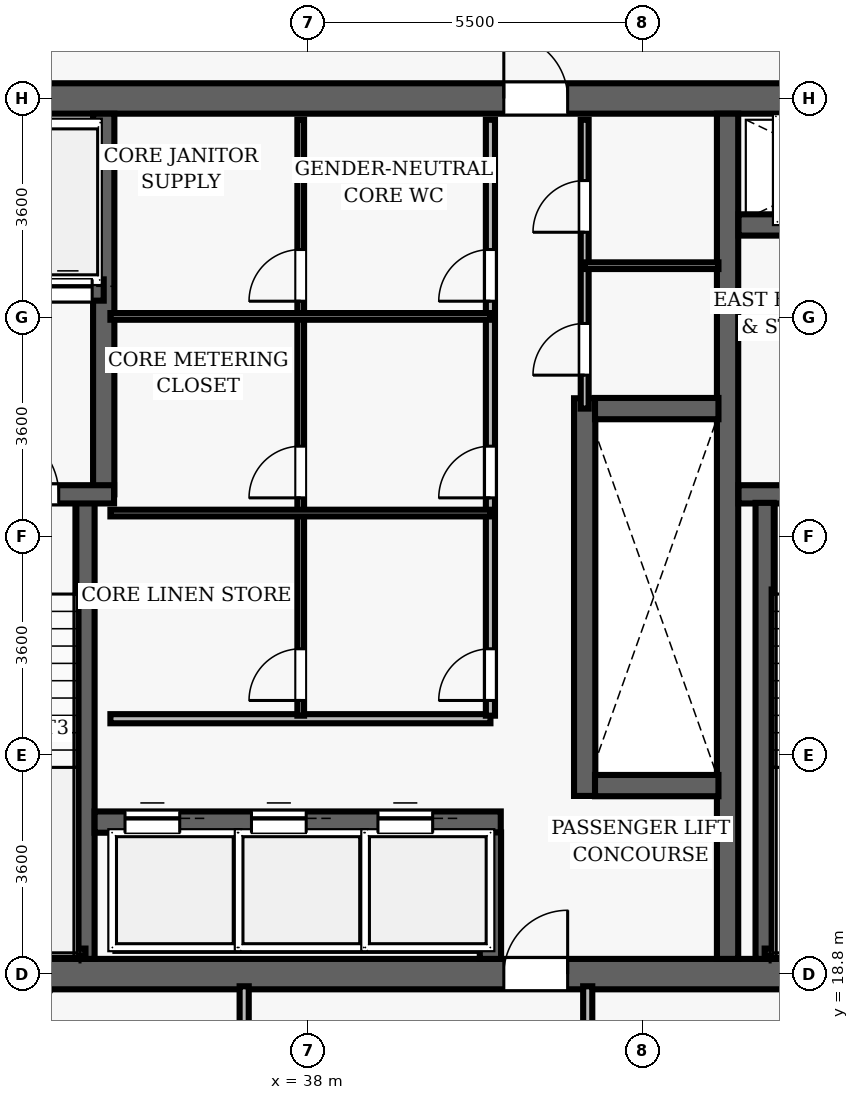
"""IFC4 building model, lengths in metres.
Left out: names, types, materials, properties, quantities, classifications, styles, units other than length and angle.
Written with IfcOpenShell. Run it as: python <this file> out.ifc"""

import sys

from ifc_helpers import new_model, si_unit, direction, frame, frame_2d, origin, place, context, subcontext, project, spatial, rectangle, extrude, element, fill, save


model = new_model("IFC4")
c1 = context("Model", 3, precision=1e-05, world=origin(), true_north=direction((0.0, 1.0)))
c2 = subcontext(c1, "Body", "Model", "MODEL_VIEW")
j1 = project(units=[si_unit("LENGTHUNIT", "METRE"), si_unit("PLANEANGLEUNIT", "RADIAN")], contexts=[c1])
p1 = place(None, origin())
s1 = spatial("IfcSite", under=j1, at=p1, CompositionType="ELEMENT")
p2 = place(p1, origin())
s2 = spatial("IfcBuilding", under=s1, at=p2, CompositionType="ELEMENT")
p3 = place(p2, frame((0.0, 0.0, 175.05)))
s3 = spatial("IfcBuildingStorey", under=s2, at=p3, CompositionType="ELEMENT", Elevation=175.05)
p4 = place(p3, frame((26.75, 18.8, 0.0), z_axis=(0.0, 0.0, 1.0), x_axis=(1.0, 0.0, 0.0)))
e1 = element("IfcWall", 1, at=p4, inside=s3, PredefinedType="SHEAR", context=c2, shape_type="SweptSolid", body=[
    extrude(rectangle(XDim=22.5, YDim=0.5, at=frame_2d((11.25, 0.0))), origin(), (0.0, 0.0, 1.0), 3.85),
])
p5 = place(p4, frame((14.47, 0.0, 0.0)))
e2 = element("IfcOpeningElement", 2, at=p5, cuts=e1, PredefinedType="OPENING", context=c2, shape_type="SweptSolid", body=[
    extrude(rectangle(XDim=1.05, YDim=2.15, at=frame_2d((0.525, 1.075))), frame((0.0, 0.26, 0.0), z_axis=(0.0, -1.0, 0.0), x_axis=(1.0, 0.0, 0.0)), (0.0, 0.0, 1.0), 0.52),
])
p6 = place(p3, frame((26.75, 33.2, 0.0), z_axis=(0.0, 0.0, 1.0), x_axis=(1.0, 0.0, 0.0)))
e3 = element("IfcWall", 3, at=p6, inside=s3, PredefinedType="SHEAR", context=c2, shape_type="SweptSolid", body=[
    extrude(rectangle(XDim=22.5, YDim=0.5, at=frame_2d((11.25, 0.0))), origin(), (0.0, 0.0, 1.0), 3.85),
])
p7 = place(p6, frame((4.57, 0.0, 0.0)))
e4 = element("IfcOpeningElement", 4, at=p7, cuts=e3, PredefinedType="OPENING", context=c2, shape_type="SweptSolid", body=[
    extrude(rectangle(XDim=1.05, YDim=2.15, at=frame_2d((0.525, 1.075))), frame((0.0, 0.26, 0.0), z_axis=(0.0, -1.0, 0.0), x_axis=(1.0, 0.0, 0.0)), (0.0, 0.0, 1.0), 0.52),
])
p8 = place(p6, frame((14.47, 0.0, 0.0)))
e5 = element("IfcOpeningElement", 5, at=p8, cuts=e3, PredefinedType="OPENING", context=c2, shape_type="SweptSolid", body=[
    extrude(rectangle(XDim=1.05, YDim=2.15, at=frame_2d((0.525, 1.075))), frame((0.0, 0.26, 0.0), z_axis=(0.0, -1.0, 0.0), x_axis=(1.0, 0.0, 0.0)), (0.0, 0.0, 1.0), 0.52),
])
p9 = place(p3, frame((44.9, 19.05, 0.0), z_axis=(0.0, 0.0, 1.0), x_axis=(0.0, 1.0, 0.0)))
e6 = element("IfcWall", 6, at=p9, inside=s3, PredefinedType="SHEAR", context=c2, shape_type="SweptSolid", body=[
    extrude(rectangle(XDim=13.9, YDim=0.35, at=frame_2d((6.95, 0.0))), origin(), (0.0, 0.0, 1.0), 3.85),
])
p10 = place(p3, frame((45.08, 26.69, 0.0), z_axis=(0.0, 0.0, 1.0), x_axis=(1.0, 0.0, 0.0)))
e7 = element("IfcWall", 7, at=p10, inside=s3, PredefinedType="SHEAR", context=c2, shape_type="SweptSolid", body=[
    extrude(rectangle(XDim=3.67, YDim=0.3, at=frame_2d((1.835, 0.0))), origin(), (0.0, 0.0, 1.0), 3.85),
])
p11 = place(p10, frame((1.05, 0.0, 0.0)))
e8 = element("IfcOpeningElement", 8, at=p11, cuts=e7, PredefinedType="OPENING", context=c2, shape_type="SweptSolid", body=[
    extrude(rectangle(XDim=1.1, YDim=2.15, at=frame_2d((0.55, 1.075))), frame((0.0, 0.16, 0.0), z_axis=(0.0, -1.0, 0.0), x_axis=(1.0, 0.0, 0.0)), (0.0, 0.0, 1.0), 0.32),
])
p12 = place(p3, frame((45.51, 19.05, 0.0), z_axis=(0.0, 0.0, 1.0), x_axis=(0.0, 1.0, 0.0)))
e9 = element("IfcWall", 9, at=p12, inside=s3, PredefinedType="SHEAR", context=c2, shape_type="SweptSolid", body=[
    extrude(rectangle(XDim=7.5, YDim=0.3, at=frame_2d((3.75, 0.0))), origin(), (0.0, 0.0, 1.0), 3.85),
])
p13 = place(p3, frame((45.51, 19.16, 0.0), z_axis=(0.0, 0.0, 1.0), x_axis=(1.0, 0.0, 0.0)))
e10 = element("IfcWall", 10, at=p13, inside=s3, PredefinedType="SHEAR", context=c2, shape_type="SweptSolid", body=[
    extrude(rectangle(XDim=3.095, YDim=0.12, at=frame_2d((1.547, 0.0))), origin(), (0.0, 0.0, 1.0), 3.85),
])
p14 = place(p3, frame((45.08, 31.12, 0.0), z_axis=(0.0, 0.0, 1.0), x_axis=(1.0, 0.0, 0.0)))
e11 = element("IfcWall", 11, at=p14, inside=s3, PredefinedType="SHEAR", context=c2, shape_type="SweptSolid", body=[
    extrude(rectangle(XDim=3.67, YDim=0.35, at=frame_2d((1.835, 0.0))), origin(), (0.0, 0.0, 1.0), 3.035),
])
p15 = place(p14, frame((1.25, 0.0, 0.0)))
e12 = element("IfcOpeningElement", 12, at=p15, cuts=e11, PredefinedType="OPENING", context=c2, shape_type="SweptSolid", body=[
    extrude(rectangle(XDim=1.1, YDim=2.15, at=frame_2d((0.55, 1.075))), frame((0.0, 0.185, 0.0), z_axis=(0.0, -1.0, 0.0), x_axis=(1.0, 0.0, 0.0)), (0.0, 0.0, 1.0), 0.37),
])
p16 = place(p3, frame((34.34, 19.05, 0.0), z_axis=(0.0, 0.0, 1.0), x_axis=(0.0, 1.0, 0.0)))
e13 = element("IfcWall", 13, at=p16, inside=s3, PredefinedType="SHEAR", context=c2, shape_type="SweptSolid", body=[
    extrude(rectangle(XDim=7.5, YDim=0.3, at=frame_2d((3.75, 0.0))), origin(), (0.0, 0.0, 1.0), 3.85),
])
p17 = place(p3, frame((34.64, 26.69, 0.0), z_axis=(0.0, 0.0, 1.0), x_axis=(0.0, 1.0, 0.0)))
e14 = element("IfcWall", 14, at=p17, inside=s3, PredefinedType="SHEAR", context=c2, shape_type="SweptSolid", body=[
    extrude(rectangle(XDim=6.26, YDim=0.35, at=frame_2d((3.13, 0.0))), origin(), (0.0, 0.0, 1.0), 3.85),
])
p18 = place(p3, frame((31.25, 26.69, 0.0), z_axis=(0.0, 0.0, 1.0), x_axis=(1.0, 0.0, 0.0)))
e15 = element("IfcWall", 15, at=p18, inside=s3, PredefinedType="SHEAR", context=c2, shape_type="SweptSolid", body=[
    extrude(rectangle(XDim=3.56, YDim=0.3, at=frame_2d((1.78, 0.0))), origin(), (0.0, 0.0, 1.0), 3.85),
])
p19 = place(p18, frame((1.55, 0.0, 0.0)))
e16 = element("IfcOpeningElement", 16, at=p19, cuts=e15, PredefinedType="OPENING", context=c2, shape_type="SweptSolid", body=[
    extrude(rectangle(XDim=1.1, YDim=2.15, at=frame_2d((0.55, 1.075))), frame((0.0, 0.16, 0.0), z_axis=(0.0, -1.0, 0.0), x_axis=(1.0, 0.0, 0.0)), (0.0, 0.0, 1.0), 0.32),
])
p20 = place(p3, frame((31.3, 19.16, 0.0), z_axis=(0.0, 0.0, 1.0), x_axis=(1.0, 0.0, 0.0)))
e17 = element("IfcWall", 17, at=p20, inside=s3, PredefinedType="SHEAR", context=c2, shape_type="SweptSolid", body=[
    extrude(rectangle(XDim=3.04, YDim=0.12, at=frame_2d((1.52, 0.0))), origin(), (0.0, 0.0, 1.0), 3.85),
])
p21 = place(p3, frame((32.23, 30.05, 0.0), z_axis=(0.0, 0.0, 1.0), x_axis=(1.0, 0.0, 0.0)))
e18 = element("IfcWall", 18, at=p21, inside=s3, PredefinedType="SHEAR", context=c2, shape_type="SweptSolid", body=[
    extrude(rectangle(XDim=2.41, YDim=0.35, at=frame_2d((1.205, 0.0))), origin(), (0.0, 0.0, 1.0), 3.035),
])
p22 = place(p21, frame((0.42, 0.0, 0.0)))
e19 = element("IfcOpeningElement", 19, at=p22, cuts=e18, PredefinedType="OPENING", context=c2, shape_type="SweptSolid", body=[
    extrude(rectangle(XDim=0.8, YDim=2.15, at=frame_2d((0.4, 1.075))), frame((0.0, 0.185, 0.0), z_axis=(0.0, -1.0, 0.0), x_axis=(1.0, 0.0, 0.0)), (0.0, 0.0, 1.0), 0.37),
])
p23 = place(p21, frame((1.42, 0.0, 0.0)))
e20 = element("IfcOpeningElement", 20, at=p23, cuts=e18, PredefinedType="OPENING", context=c2, shape_type="SweptSolid", body=[
    extrude(rectangle(XDim=0.8, YDim=2.15, at=frame_2d((0.4, 1.075))), frame((0.0, 0.185, 0.0), z_axis=(0.0, -1.0, 0.0), x_axis=(1.0, 0.0, 0.0)), (0.0, 0.0, 1.0), 0.37),
])
p24 = place(p3, frame((42.55, 21.73, 0.0), z_axis=(0.0, 0.0, 1.0), x_axis=(0.0, 1.0, 0.0)))
e21 = element("IfcWall", 21, at=p24, inside=s3, PredefinedType="SHEAR", context=c2, shape_type="SweptSolid", body=[
    extrude(rectangle(XDim=6.54, YDim=0.35, at=frame_2d((3.27, 0.0))), origin(), (0.0, 0.0, 1.0), 3.035),
])
for number, where, z_axis, x_axis in (
    (22, (42.72, 21.9, 0.0), (0.0, 0.0, 1.0), (1.0, 0.0, 0.0)),
    (23, (42.72, 28.1, 0.0), (0.0, 0.0, 1.0), (1.0, 0.0, 0.0)),
):
    element("IfcWall", number, at=place(p3, frame(where, z_axis=z_axis, x_axis=x_axis)), inside=s3, PredefinedType="SHEAR", context=c2, shape_type="SweptSolid", body=[
        extrude(rectangle(XDim=2.03, YDim=0.35, at=frame_2d((1.015, 0.0))), origin(), (0.0, 0.0, 1.0), 3.035),
    ])
p25 = place(p3, frame((34.49, 21.3, 0.0), z_axis=(0.0, 0.0, 1.0), x_axis=(1.0, 0.0, 0.0)))
e24 = element("IfcWall", 24, at=p25, inside=s3, PredefinedType="SHEAR", context=c2, shape_type="SweptSolid", body=[
    extrude(rectangle(XDim=6.68, YDim=0.35, at=frame_2d((3.34, 0.0))), origin(), (0.0, 0.0, 1.0), 3.035),
])
p26 = place(p25, frame((0.5, 0.0, 0.0)))
e25 = element("IfcOpeningElement", 25, at=p26, cuts=e24, PredefinedType="OPENING", context=c2, shape_type="SweptSolid", body=[
    extrude(rectangle(XDim=0.9, YDim=2.15, at=frame_2d((0.45, 1.075))), frame((0.0, 0.185, 0.0), z_axis=(0.0, -1.0, 0.0), x_axis=(1.0, 0.0, 0.0)), (0.0, 0.0, 1.0), 0.37),
])
p27 = place(p25, frame((2.58, 0.0, 0.0)))
e26 = element("IfcOpeningElement", 26, at=p27, cuts=e24, PredefinedType="OPENING", context=c2, shape_type="SweptSolid", body=[
    extrude(rectangle(XDim=0.9, YDim=2.15, at=frame_2d((0.45, 1.075))), frame((0.0, 0.185, 0.0), z_axis=(0.0, -1.0, 0.0), x_axis=(1.0, 0.0, 0.0)), (0.0, 0.0, 1.0), 0.37),
])
p28 = place(p25, frame((4.66, 0.0, 0.0)))
e27 = element("IfcOpeningElement", 27, at=p28, cuts=e24, PredefinedType="OPENING", context=c2, shape_type="SweptSolid", body=[
    extrude(rectangle(XDim=0.9, YDim=2.15, at=frame_2d((0.45, 1.075))), frame((0.0, 0.185, 0.0), z_axis=(0.0, -1.0, 0.0), x_axis=(1.0, 0.0, 0.0)), (0.0, 0.0, 1.0), 0.37),
])
p29 = place(p3, frame((41.0, 19.05, 0.0), z_axis=(0.0, 0.0, 1.0), x_axis=(0.0, 1.0, 0.0)))
e28 = element("IfcWall", 28, at=p29, inside=s3, PredefinedType="SHEAR", context=c2, shape_type="SweptSolid", body=[
    extrude(rectangle(XDim=2.08, YDim=0.35, at=frame_2d((1.04, 0.0))), origin(), (0.0, 0.0, 1.0), 3.035),
])
p30 = place(p3, frame((34.75, 23.0, 0.0), z_axis=(0.0, 0.0, 1.0), x_axis=(1.0, 0.0, 0.0)))
e29 = element("IfcWall", 29, at=p30, inside=s3, PredefinedType="PARTITIONING", context=c2, shape_type="SweptSolid", body=[
    extrude(rectangle(XDim=6.25, YDim=0.15, at=frame_2d((3.125, 0.0))), origin(), (0.0, 0.0, 1.0), 3.035),
])
p31 = place(p3, frame((41.0, 23.05, 0.0), z_axis=(0.0, 0.0, 1.0), x_axis=(0.0, 1.0, 0.0)))
e30 = element("IfcWall", 30, at=p31, inside=s3, PredefinedType="PARTITIONING", context=c2, shape_type="SweptSolid", body=[
    extrude(rectangle(XDim=9.8, YDim=0.15, at=frame_2d((4.9, 0.0))), origin(), (0.0, 0.0, 1.0), 3.035),
])
p32 = place(p31, frame((0.25, 0.0, 0.0)))
e31 = element("IfcOpeningElement", 31, at=p32, cuts=e30, PredefinedType="OPENING", context=c2, shape_type="SweptSolid", body=[
    extrude(rectangle(XDim=0.85, YDim=2.1, at=frame_2d((0.425, 1.05))), frame((0.0, 0.085, 0.0), z_axis=(0.0, -1.0, 0.0), x_axis=(1.0, 0.0, 0.0)), (0.0, 0.0, 1.0), 0.17),
])
p33 = place(p31, frame((3.582, 0.0, 0.0)))
e32 = element("IfcOpeningElement", 32, at=p33, cuts=e30, PredefinedType="OPENING", context=c2, shape_type="SweptSolid", body=[
    extrude(rectangle(XDim=0.85, YDim=2.1, at=frame_2d((0.425, 1.05))), frame((0.0, 0.085, 0.0), z_axis=(0.0, -1.0, 0.0), x_axis=(1.0, 0.0, 0.0)), (0.0, 0.0, 1.0), 0.17),
])
p34 = place(p31, frame((6.816, 0.0, 0.0)))
e33 = element("IfcOpeningElement", 33, at=p34, cuts=e30, PredefinedType="OPENING", context=c2, shape_type="SweptSolid", body=[
    extrude(rectangle(XDim=0.85, YDim=2.1, at=frame_2d((0.425, 1.05))), frame((0.0, 0.085, 0.0), z_axis=(0.0, -1.0, 0.0), x_axis=(1.0, 0.0, 0.0)), (0.0, 0.0, 1.0), 0.17),
])
p35 = place(p3, frame((37.88, 23.05, 0.0), z_axis=(0.0, 0.0, 1.0), x_axis=(0.0, 1.0, 0.0)))
e34 = element("IfcWall", 34, at=p35, inside=s3, PredefinedType="PARTITIONING", context=c2, shape_type="SweptSolid", body=[
    extrude(rectangle(XDim=9.8, YDim=0.11, at=frame_2d((4.9, 0.0))), origin(), (0.0, 0.0, 1.0), 3.035),
])
p36 = place(p35, frame((0.25, 0.0, 0.0)))
e35 = element("IfcOpeningElement", 35, at=p36, cuts=e34, PredefinedType="OPENING", context=c2, shape_type="SweptSolid", body=[
    extrude(rectangle(XDim=0.85, YDim=2.1, at=frame_2d((0.425, 1.05))), frame((0.0, 0.065, 0.0), z_axis=(0.0, -1.0, 0.0), x_axis=(1.0, 0.0, 0.0)), (0.0, 0.0, 1.0), 0.13),
])
p37 = place(p35, frame((3.582, 0.0, 0.0)))
e36 = element("IfcOpeningElement", 36, at=p37, cuts=e34, PredefinedType="OPENING", context=c2, shape_type="SweptSolid", body=[
    extrude(rectangle(XDim=0.85, YDim=2.1, at=frame_2d((0.425, 1.05))), frame((0.0, 0.065, 0.0), z_axis=(0.0, -1.0, 0.0), x_axis=(1.0, 0.0, 0.0)), (0.0, 0.0, 1.0), 0.13),
])
p38 = place(p35, frame((6.816, 0.0, 0.0)))
e37 = element("IfcOpeningElement", 37, at=p38, cuts=e34, PredefinedType="OPENING", context=c2, shape_type="SweptSolid", body=[
    extrude(rectangle(XDim=0.85, YDim=2.1, at=frame_2d((0.425, 1.05))), frame((0.0, 0.065, 0.0), z_axis=(0.0, -1.0, 0.0), x_axis=(1.0, 0.0, 0.0)), (0.0, 0.0, 1.0), 0.13),
])
for number, where, z_axis, x_axis in (
    (38, (34.75, 26.382, 0.0), (0.0, 0.0, 1.0), (1.0, 0.0, 0.0)),
    (39, (34.75, 29.616, 0.0), (0.0, 0.0, 1.0), (1.0, 0.0, 0.0)),
):
    element("IfcWall", number, at=place(p3, frame(where, z_axis=z_axis, x_axis=x_axis)), inside=s3, PredefinedType="PARTITIONING", context=c2, shape_type="SweptSolid", body=[
        extrude(rectangle(XDim=6.25, YDim=0.11, at=frame_2d((3.125, 0.0))), origin(), (0.0, 0.0, 1.0), 3.035),
    ])
p39 = place(p3, frame((42.55, 28.1, 0.0), z_axis=(0.0, 0.0, 1.0), x_axis=(0.0, 1.0, 0.0)))
e40 = element("IfcWall", 40, at=p39, inside=s3, PredefinedType="PARTITIONING", context=c2, shape_type="SweptSolid", body=[
    extrude(rectangle(XDim=4.75, YDim=0.13, at=frame_2d((2.375, 0.0))), origin(), (0.0, 0.0, 1.0), 3.035),
])
p40 = place(p39, frame((0.55, 0.0, 0.0)))
e41 = element("IfcOpeningElement", 41, at=p40, cuts=e40, PredefinedType="OPENING", context=c2, shape_type="SweptSolid", body=[
    extrude(rectangle(XDim=0.85, YDim=2.1, at=frame_2d((0.425, 1.05))), frame((0.0, 0.075, 0.0), z_axis=(0.0, -1.0, 0.0), x_axis=(1.0, 0.0, 0.0)), (0.0, 0.0, 1.0), 0.15),
])
p41 = place(p39, frame((2.9, 0.0, 0.0)))
e42 = element("IfcOpeningElement", 42, at=p41, cuts=e40, PredefinedType="OPENING", context=c2, shape_type="SweptSolid", body=[
    extrude(rectangle(XDim=0.85, YDim=2.1, at=frame_2d((0.425, 1.05))), frame((0.0, 0.075, 0.0), z_axis=(0.0, -1.0, 0.0), x_axis=(1.0, 0.0, 0.0)), (0.0, 0.0, 1.0), 0.15),
])
p42 = place(p3, frame((42.55, 30.45, 0.0), z_axis=(0.0, 0.0, 1.0), x_axis=(1.0, 0.0, 0.0)))
e43 = element("IfcWall", 43, at=p42, inside=s3, PredefinedType="PARTITIONING", context=c2, shape_type="SweptSolid", body=[
    extrude(rectangle(XDim=2.2, YDim=0.11, at=frame_2d((1.1, 0.0))), origin(), (0.0, 0.0, 1.0), 3.035),
])
p43 = place(p3, frame((36.95, 11.2, 0.0), z_axis=(0.0, 0.0, 1.0), x_axis=(0.0, 1.0, 0.0)))
e44 = element("IfcWall", 44, at=p43, inside=s3, PredefinedType="PARTITIONING", context=c2, shape_type="SweptSolid", body=[
    extrude(rectangle(XDim=7.4, YDim=0.15, at=frame_2d((3.7, 0.0))), origin(), (0.0, 0.0, 1.0), 3.035),
])
p44 = place(p43, frame((5.075, 0.0, 0.0)))
e45 = element("IfcOpeningElement", 45, at=p44, cuts=e44, PredefinedType="OPENING", context=c2, shape_type="SweptSolid", body=[
    extrude(rectangle(XDim=0.95, YDim=2.15, at=frame_2d((0.475, 1.075))), frame((0.0, 0.085, 0.0), z_axis=(0.0, -1.0, 0.0), x_axis=(1.0, 0.0, 0.0)), (0.0, 0.0, 1.0), 0.17),
])
p45 = place(p3, frame((42.6, 16.65, 0.0), z_axis=(0.0, 0.0, 1.0), x_axis=(0.0, 1.0, 0.0)))
e46 = element("IfcWall", 46, at=p45, inside=s3, PredefinedType="PARTITIONING", context=c2, shape_type="SweptSolid", body=[
    extrude(rectangle(XDim=1.95, YDim=0.15, at=frame_2d((0.975, 0.0))), origin(), (0.0, 0.0, 1.0), 3.035),
])
p46 = place(p19, origin())
e47 = element("IfcDoor", 47, at=p46, inside=s3, OperationType="SINGLE_SWING_LEFT", PredefinedType="DOOR", context=c2, shape_type="SweptSolid", body=[
    extrude(rectangle(XDim=1.1, YDim=2.15, at=frame_2d((0.55, 1.075))), frame((0.0, 0.025, 0.0), z_axis=(0.0, -1.0, 0.0), x_axis=(1.0, 0.0, 0.0)), (0.0, 0.0, 1.0), 0.05),
])
fill(e16, e47)
p47 = place(p8, origin())
e48 = element("IfcDoor", 48, at=p47, inside=s3, OperationType="SINGLE_SWING_LEFT", PredefinedType="DOOR", context=c2, shape_type="SweptSolid", body=[
    extrude(rectangle(XDim=1.05, YDim=2.15, at=frame_2d((0.525, 1.075))), frame((0.0, 0.025, 0.0), z_axis=(0.0, -1.0, 0.0), x_axis=(1.0, 0.0, 0.0)), (0.0, 0.0, 1.0), 0.05),
])
fill(e5, e48)
p48 = place(p5, origin())
e49 = element("IfcDoor", 49, at=p48, inside=s3, OperationType="SINGLE_SWING_RIGHT", PredefinedType="DOOR", context=c2, shape_type="SweptSolid", body=[
    extrude(rectangle(XDim=1.05, YDim=2.15, at=frame_2d((0.525, 1.075))), frame((0.0, 0.025, 0.0), z_axis=(0.0, -1.0, 0.0), x_axis=(1.0, 0.0, 0.0)), (0.0, 0.0, 1.0), 0.05),
])
fill(e2, e49)
p49 = place(p32, origin())
e50 = element("IfcDoor", 50, at=p49, inside=s3, OperationType="SINGLE_SWING_LEFT", PredefinedType="DOOR", context=c2, shape_type="SweptSolid", body=[
    extrude(rectangle(XDim=0.85, YDim=2.1, at=frame_2d((0.425, 1.05))), frame((0.0, 0.025, 0.0), z_axis=(0.0, -1.0, 0.0), x_axis=(1.0, 0.0, 0.0)), (0.0, 0.0, 1.0), 0.05),
])
fill(e31, e50)
p50 = place(p36, origin())
e51 = element("IfcDoor", 51, at=p50, inside=s3, OperationType="SINGLE_SWING_LEFT", PredefinedType="DOOR", context=c2, shape_type="SweptSolid", body=[
    extrude(rectangle(XDim=0.85, YDim=2.1, at=frame_2d((0.425, 1.05))), frame((0.0, 0.025, 0.0), z_axis=(0.0, -1.0, 0.0), x_axis=(1.0, 0.0, 0.0)), (0.0, 0.0, 1.0), 0.05),
])
fill(e35, e51)
p51 = place(p33, origin())
e52 = element("IfcDoor", 52, at=p51, inside=s3, OperationType="SINGLE_SWING_LEFT", PredefinedType="DOOR", context=c2, shape_type="SweptSolid", body=[
    extrude(rectangle(XDim=0.85, YDim=2.1, at=frame_2d((0.425, 1.05))), frame((0.0, 0.025, 0.0), z_axis=(0.0, -1.0, 0.0), x_axis=(1.0, 0.0, 0.0)), (0.0, 0.0, 1.0), 0.05),
])
fill(e32, e52)
p52 = place(p37, origin())
e53 = element("IfcDoor", 53, at=p52, inside=s3, OperationType="SINGLE_SWING_LEFT", PredefinedType="DOOR", context=c2, shape_type="SweptSolid", body=[
    extrude(rectangle(XDim=0.85, YDim=2.1, at=frame_2d((0.425, 1.05))), frame((0.0, 0.025, 0.0), z_axis=(0.0, -1.0, 0.0), x_axis=(1.0, 0.0, 0.0)), (0.0, 0.0, 1.0), 0.05),
])
fill(e36, e53)
p53 = place(p34, origin())
e54 = element("IfcDoor", 54, at=p53, inside=s3, OperationType="SINGLE_SWING_LEFT", PredefinedType="DOOR", context=c2, shape_type="SweptSolid", body=[
    extrude(rectangle(XDim=0.85, YDim=2.1, at=frame_2d((0.425, 1.05))), frame((0.0, 0.025, 0.0), z_axis=(0.0, -1.0, 0.0), x_axis=(1.0, 0.0, 0.0)), (0.0, 0.0, 1.0), 0.05),
])
fill(e33, e54)
p54 = place(p38, origin())
e55 = element("IfcDoor", 55, at=p54, inside=s3, OperationType="SINGLE_SWING_LEFT", PredefinedType="DOOR", context=c2, shape_type="SweptSolid", body=[
    extrude(rectangle(XDim=0.85, YDim=2.1, at=frame_2d((0.425, 1.05))), frame((0.0, 0.025, 0.0), z_axis=(0.0, -1.0, 0.0), x_axis=(1.0, 0.0, 0.0)), (0.0, 0.0, 1.0), 0.05),
])
fill(e37, e55)
p55 = place(p40, origin())
e56 = element("IfcDoor", 56, at=p55, inside=s3, OperationType="SINGLE_SWING_LEFT", PredefinedType="DOOR", context=c2, shape_type="SweptSolid", body=[
    extrude(rectangle(XDim=0.85, YDim=2.1, at=frame_2d((0.425, 1.05))), frame((0.0, 0.025, 0.0), z_axis=(0.0, -1.0, 0.0), x_axis=(1.0, 0.0, 0.0)), (0.0, 0.0, 1.0), 0.05),
])
fill(e41, e56)
p56 = place(p41, origin())
e57 = element("IfcDoor", 57, at=p56, inside=s3, OperationType="SINGLE_SWING_LEFT", PredefinedType="DOOR", context=c2, shape_type="SweptSolid", body=[
    extrude(rectangle(XDim=0.85, YDim=2.1, at=frame_2d((0.425, 1.05))), frame((0.0, 0.025, 0.0), z_axis=(0.0, -1.0, 0.0), x_axis=(1.0, 0.0, 0.0)), (0.0, 0.0, 1.0), 0.05),
])
fill(e42, e57)
p57 = place(p26, origin())
e58 = element("IfcDoor", 58, at=p57, inside=s3, OperationType="SLIDING_TO_LEFT", PredefinedType="DOOR", context=c2, shape_type="SweptSolid", body=[
    extrude(rectangle(XDim=0.9, YDim=2.15, at=frame_2d((0.45, 1.075))), frame((0.0, 0.025, 0.0), z_axis=(0.0, -1.0, 0.0), x_axis=(1.0, 0.0, 0.0)), (0.0, 0.0, 1.0), 0.05),
])
fill(e25, e58)
p58 = place(p27, origin())
e59 = element("IfcDoor", 59, at=p58, inside=s3, OperationType="SLIDING_TO_LEFT", PredefinedType="DOOR", context=c2, shape_type="SweptSolid", body=[
    extrude(rectangle(XDim=0.9, YDim=2.15, at=frame_2d((0.45, 1.075))), frame((0.0, 0.025, 0.0), z_axis=(0.0, -1.0, 0.0), x_axis=(1.0, 0.0, 0.0)), (0.0, 0.0, 1.0), 0.05),
])
fill(e26, e59)
p59 = place(p28, origin())
e60 = element("IfcDoor", 60, at=p59, inside=s3, OperationType="SLIDING_TO_LEFT", PredefinedType="DOOR", context=c2, shape_type="SweptSolid", body=[
    extrude(rectangle(XDim=0.9, YDim=2.15, at=frame_2d((0.45, 1.075))), frame((0.0, 0.025, 0.0), z_axis=(0.0, -1.0, 0.0), x_axis=(1.0, 0.0, 0.0)), (0.0, 0.0, 1.0), 0.05),
])
fill(e27, e60)
p60 = place(p23, origin())
e61 = element("IfcDoor", 61, at=p60, inside=s3, OperationType="SLIDING_TO_LEFT", PredefinedType="DOOR", context=c2, shape_type="SweptSolid", body=[
    extrude(rectangle(XDim=0.8, YDim=2.15, at=frame_2d((0.4, 1.075))), frame((0.0, 0.025, 0.0), z_axis=(0.0, -1.0, 0.0), x_axis=(1.0, 0.0, 0.0)), (0.0, 0.0, 1.0), 0.05),
])
fill(e20, e61)
save(model, sys.argv[1])
